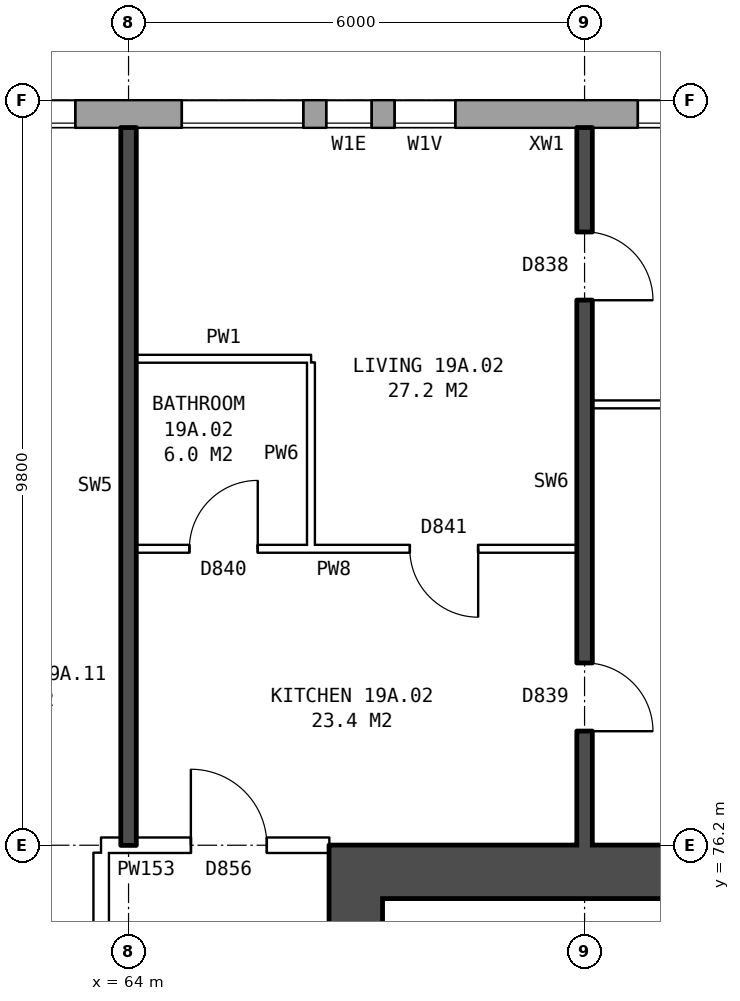
"""IFC4 building model, lengths in metres.
Left out: names, types, materials, properties, quantities, classifications, styles, units other than length and angle.
Written with IfcOpenShell. Run it as: python <this file> out.ifc"""

import sys

from ifc_helpers import new_model, si_unit, direction, frame, frame_2d, origin, place, context, subcontext, project, spatial, rectangle, extrude, element, fill, save


model = new_model("IFC4")
c1 = context("Model", 3, precision=1e-05, world=origin(), true_north=direction((0.0, 1.0)))
c2 = subcontext(c1, "Body", "Model", "MODEL_VIEW")
j1 = project(units=[si_unit("LENGTHUNIT", "METRE"), si_unit("PLANEANGLEUNIT", "RADIAN")], contexts=[c1])
p1 = place(None, origin())
s1 = spatial("IfcSite", under=j1, at=p1, CompositionType="ELEMENT")
p2 = place(p1, origin())
s2 = spatial("IfcBuilding", under=s1, at=p2, CompositionType="ELEMENT")
p3 = place(p2, frame((0.0, 0.0, 71.6)))
s3 = spatial("IfcBuildingStorey", under=s2, at=p3, CompositionType="ELEMENT", Elevation=71.6)
p4 = place(p3, frame((72.925, 85.82, 0.0), z_axis=(0.0, 0.0, 1.0), x_axis=(-1.0, 0.0, 0.0)))
e1 = element("IfcWall", 1, at=p4, inside=s3, PredefinedType="STANDARD", context=c2, shape_type="SweptSolid", body=[
    extrude(rectangle(XDim=46.601, YDim=0.36, at=frame_2d((23.3, 0.0))), origin(), (0.0, 0.0, 1.0), 2.85),
])
p5 = place(p4, frame((0.625, 0.0, 0.8)))
e2 = element("IfcOpeningElement", 2, at=p5, cuts=e1, PredefinedType="OPENING", context=c2, shape_type="SweptSolid", body=[
    extrude(rectangle(XDim=1.6, YDim=1.8, at=frame_2d((0.8, 0.9))), frame((0.0, 0.19, 0.0), z_axis=(0.0, -1.0, 0.0), x_axis=(1.0, 0.0, 0.0)), (0.0, 0.0, 1.0), 0.38),
])
p6 = place(p4, frame((4.625, 0.0, 0.8)))
e3 = element("IfcOpeningElement", 3, at=p6, cuts=e1, PredefinedType="OPENING", context=c2, shape_type="SweptSolid", body=[
    extrude(rectangle(XDim=0.8, YDim=0.9, at=frame_2d((0.4, 0.45))), frame((0.0, 0.19, 0.0), z_axis=(0.0, -1.0, 0.0), x_axis=(1.0, 0.0, 0.0)), (0.0, 0.0, 1.0), 0.38),
])
p7 = place(p4, frame((6.625, 0.0, 0.8)))
e4 = element("IfcOpeningElement", 4, at=p7, cuts=e1, PredefinedType="OPENING", context=c2, shape_type="SweptSolid", body=[
    extrude(rectangle(XDim=1.6, YDim=1.8, at=frame_2d((0.8, 0.9))), frame((0.0, 0.19, 0.0), z_axis=(0.0, -1.0, 0.0), x_axis=(1.0, 0.0, 0.0)), (0.0, 0.0, 1.0), 0.38),
])
p8 = place(p4, frame((9.625, 0.0, 0.8)))
e5 = element("IfcOpeningElement", 5, at=p8, cuts=e1, PredefinedType="OPENING", context=c2, shape_type="SweptSolid", body=[
    extrude(rectangle(XDim=1.6, YDim=1.8, at=frame_2d((0.8, 0.9))), frame((0.0, 0.19, 0.0), z_axis=(0.0, -1.0, 0.0), x_axis=(1.0, 0.0, 0.0)), (0.0, 0.0, 1.0), 0.38),
])
p9 = place(p4, frame((12.625, 0.0, 0.8)))
e6 = element("IfcOpeningElement", 6, at=p9, cuts=e1, PredefinedType="OPENING", context=c2, shape_type="SweptSolid", body=[
    extrude(rectangle(XDim=1.6, YDim=1.8, at=frame_2d((0.8, 0.9))), frame((0.0, 0.19, 0.0), z_axis=(0.0, -1.0, 0.0), x_axis=(1.0, 0.0, 0.0)), (0.0, 0.0, 1.0), 0.38),
])
p10 = place(p4, frame((15.625, 0.0, 0.8)))
e7 = element("IfcOpeningElement", 7, at=p10, cuts=e1, PredefinedType="OPENING", context=c2, shape_type="SweptSolid", body=[
    extrude(rectangle(XDim=1.6, YDim=1.8, at=frame_2d((0.8, 0.9))), frame((0.0, 0.19, 0.0), z_axis=(0.0, -1.0, 0.0), x_axis=(1.0, 0.0, 0.0)), (0.0, 0.0, 1.0), 0.38),
])
p11 = place(p4, frame((18.625, 0.0, 0.8)))
e8 = element("IfcOpeningElement", 8, at=p11, cuts=e1, PredefinedType="OPENING", context=c2, shape_type="SweptSolid", body=[
    extrude(rectangle(XDim=1.6, YDim=1.8, at=frame_2d((0.8, 0.9))), frame((0.0, 0.19, 0.0), z_axis=(0.0, -1.0, 0.0), x_axis=(1.0, 0.0, 0.0)), (0.0, 0.0, 1.0), 0.38),
])
p12 = place(p4, frame((21.625, 0.0, 0.8)))
e9 = element("IfcOpeningElement", 9, at=p12, cuts=e1, PredefinedType="OPENING", context=c2, shape_type="SweptSolid", body=[
    extrude(rectangle(XDim=1.6, YDim=1.8, at=frame_2d((0.8, 0.9))), frame((0.0, 0.19, 0.0), z_axis=(0.0, -1.0, 0.0), x_axis=(1.0, 0.0, 0.0)), (0.0, 0.0, 1.0), 0.38),
])
p13 = place(p4, frame((24.625, 0.0, 0.8)))
e10 = element("IfcOpeningElement", 10, at=p13, cuts=e1, PredefinedType="OPENING", context=c2, shape_type="SweptSolid", body=[
    extrude(rectangle(XDim=1.6, YDim=1.8, at=frame_2d((0.8, 0.9))), frame((0.0, 0.19, 0.0), z_axis=(0.0, -1.0, 0.0), x_axis=(1.0, 0.0, 0.0)), (0.0, 0.0, 1.0), 0.38),
])
p14 = place(p4, frame((27.625, 0.0, 0.8)))
e11 = element("IfcOpeningElement", 11, at=p14, cuts=e1, PredefinedType="OPENING", context=c2, shape_type="SweptSolid", body=[
    extrude(rectangle(XDim=1.6, YDim=1.8, at=frame_2d((0.8, 0.9))), frame((0.0, 0.19, 0.0), z_axis=(0.0, -1.0, 0.0), x_axis=(1.0, 0.0, 0.0)), (0.0, 0.0, 1.0), 0.38),
])
p15 = place(p4, frame((30.625, 0.0, 0.8)))
e12 = element("IfcOpeningElement", 12, at=p15, cuts=e1, PredefinedType="OPENING", context=c2, shape_type="SweptSolid", body=[
    extrude(rectangle(XDim=1.6, YDim=1.8, at=frame_2d((0.8, 0.9))), frame((0.0, 0.19, 0.0), z_axis=(0.0, -1.0, 0.0), x_axis=(1.0, 0.0, 0.0)), (0.0, 0.0, 1.0), 0.38),
])
p16 = place(p4, frame((33.625, 0.0, 0.8)))
e13 = element("IfcOpeningElement", 13, at=p16, cuts=e1, PredefinedType="OPENING", context=c2, shape_type="SweptSolid", body=[
    extrude(rectangle(XDim=1.6, YDim=1.8, at=frame_2d((0.8, 0.9))), frame((0.0, 0.19, 0.0), z_axis=(0.0, -1.0, 0.0), x_axis=(1.0, 0.0, 0.0)), (0.0, 0.0, 1.0), 0.38),
])
p17 = place(p4, frame((36.625, 0.0, 0.8)))
e14 = element("IfcOpeningElement", 14, at=p17, cuts=e1, PredefinedType="OPENING", context=c2, shape_type="SweptSolid", body=[
    extrude(rectangle(XDim=1.6, YDim=1.8, at=frame_2d((0.8, 0.9))), frame((0.0, 0.19, 0.0), z_axis=(0.0, -1.0, 0.0), x_axis=(1.0, 0.0, 0.0)), (0.0, 0.0, 1.0), 0.38),
])
p18 = place(p4, frame((39.625, 0.0, 0.8)))
e15 = element("IfcOpeningElement", 15, at=p18, cuts=e1, PredefinedType="OPENING", context=c2, shape_type="SweptSolid", body=[
    extrude(rectangle(XDim=1.6, YDim=1.8, at=frame_2d((0.8, 0.9))), frame((0.0, 0.19, 0.0), z_axis=(0.0, -1.0, 0.0), x_axis=(1.0, 0.0, 0.0)), (0.0, 0.0, 1.0), 0.38),
])
p19 = place(p4, frame((43.225, 0.0, 1.7)))
e16 = element("IfcOpeningElement", 16, at=p19, cuts=e1, PredefinedType="OPENING", context=c2, shape_type="SweptSolid", body=[
    extrude(rectangle(XDim=0.6, YDim=0.9, at=frame_2d((0.3, 0.45))), frame((0.0, 0.19, 0.0), z_axis=(0.0, -1.0, 0.0), x_axis=(1.0, 0.0, 0.0)), (0.0, 0.0, 1.0), 0.38),
])
p20 = place(p4, frame((5.725, 0.0, 0.8)))
e17 = element("IfcOpeningElement", 17, at=p20, cuts=e1, PredefinedType="OPENING", context=c2, shape_type="SweptSolid", body=[
    extrude(rectangle(XDim=0.6, YDim=1.8, at=frame_2d((0.3, 0.9))), frame((0.0, 0.19, 0.0), z_axis=(0.0, -1.0, 0.0), x_axis=(1.0, 0.0, 0.0)), (0.0, 0.0, 1.0), 0.38),
])
p21 = place(p4, frame((44.125, 0.0, 1.0)))
e18 = element("IfcOpeningElement", 18, at=p21, cuts=e1, PredefinedType="OPENING", context=c2, shape_type="SweptSolid", body=[
    extrude(rectangle(XDim=0.6, YDim=1.5, at=frame_2d((0.3, 0.75))), frame((0.0, 0.19, 0.0), z_axis=(0.0, -1.0, 0.0), x_axis=(1.0, 0.0, 0.0)), (0.0, 0.0, 1.0), 0.38),
])
p22 = place(p3, frame((66.99, 64.5, 0.0), z_axis=(0.0, 0.0, 1.0), x_axis=(0.0, 1.0, 0.0)))
e19 = element("IfcWall", 19, at=p22, inside=s3, PredefinedType="SHEAR", context=c2, shape_type="SweptSolid", body=[
    extrude(rectangle(XDim=11.0, YDim=0.7, at=frame_2d((5.5, 0.0))), origin(), (0.0, 0.0, 1.0), 2.85),
])
p23 = place(p22, frame((0.625, 0.0, 0.0)))
e20 = element("IfcOpeningElement", 20, at=p23, cuts=e19, PredefinedType="OPENING", context=c2, shape_type="SweptSolid", body=[
    extrude(rectangle(XDim=1.1, YDim=2.1, at=frame_2d((0.55, 1.05))), frame((0.0, 0.36, 0.0), z_axis=(0.0, -1.0, 0.0), x_axis=(1.0, 0.0, 0.0)), (0.0, 0.0, 1.0), 0.72),
])
p24 = place(p22, frame((9.2, 0.0, 0.0)))
e21 = element("IfcOpeningElement", 21, at=p24, cuts=e19, PredefinedType="OPENING", context=c2, shape_type="SweptSolid", body=[
    extrude(rectangle(XDim=1.1, YDim=2.1, at=frame_2d((0.55, 1.05))), frame((0.0, 0.36, 0.0), z_axis=(0.0, -1.0, 0.0), x_axis=(1.0, 0.0, 0.0)), (0.0, 0.0, 1.0), 0.72),
])
p25 = place(p3, frame((66.64, 75.85, 0.0), z_axis=(0.0, 0.0, 1.0), x_axis=(1.0, 0.0, 0.0)))
e22 = element("IfcWall", 22, at=p25, inside=s3, PredefinedType="SHEAR", context=c2, shape_type="SweptSolid", body=[
    extrude(rectangle(XDim=9.0, YDim=0.7, at=frame_2d((4.5, 0.0))), origin(), (0.0, 0.0, 1.0), 2.85),
])
p26 = place(p3, frame((63.64, 63.9, 0.0), z_axis=(0.0, 0.0, 1.0), x_axis=(0.0, 1.0, 0.0)))
e23 = element("IfcWall", 23, at=p26, inside=s3, PredefinedType="PARTITIONING", context=c2, shape_type="SweptSolid", body=[
    extrude(rectangle(XDim=12.2, YDim=0.2, at=frame_2d((6.1, 0.0))), origin(), (0.0, 0.0, 1.0), 2.85),
])
p27 = place(p26, frame((5.1, 0.0, 0.0)))
e24 = element("IfcOpeningElement", 24, at=p27, cuts=e23, PredefinedType="OPENING", context=c2, shape_type="SweptSolid", body=[
    extrude(rectangle(XDim=2.0, YDim=2.1, at=frame_2d((1.0, 1.05))), frame((0.0, 0.11, 0.0), z_axis=(0.0, -1.0, 0.0), x_axis=(1.0, 0.0, 0.0)), (0.0, 0.0, 1.0), 0.22),
])
p28 = place(p3, frame((63.64, 76.2, 0.0), z_axis=(0.0, 0.0, 1.0), x_axis=(1.0, 0.0, 0.0)))
e25 = element("IfcWall", 25, at=p28, inside=s3, PredefinedType="PARTITIONING", context=c2, shape_type="SweptSolid", body=[
    extrude(rectangle(XDim=3.0, YDim=0.2, at=frame_2d((1.5, 0.0))), origin(), (0.0, 0.0, 1.0), 2.85),
])
p29 = place(p28, frame((1.18, 0.0, 0.0)))
e26 = element("IfcOpeningElement", 26, at=p29, cuts=e25, PredefinedType="OPENING", context=c2, shape_type="SweptSolid", body=[
    extrude(rectangle(XDim=1.0, YDim=2.1, at=frame_2d((0.5, 1.05))), frame((0.0, 0.11, 0.0), z_axis=(0.0, -1.0, 0.0), x_axis=(1.0, 0.0, 0.0)), (0.0, 0.0, 1.0), 0.22),
])
p30 = place(p3, frame((64.1, 80.1, 0.0), z_axis=(0.0, 0.0, 1.0), x_axis=(1.0, 0.0, 0.0)))
e27 = element("IfcWall", 27, at=p30, inside=s3, PredefinedType="PARTITIONING", context=c2, shape_type="SweptSolid", body=[
    extrude(rectangle(XDim=5.8, YDim=0.1, at=frame_2d((2.9, 0.0))), origin(), (0.0, 0.0, 1.0), 2.85),
])
p31 = place(p30, frame((3.6, 0.0, 0.0)))
e28 = element("IfcOpeningElement", 28, at=p31, cuts=e27, PredefinedType="OPENING", context=c2, shape_type="SweptSolid", body=[
    extrude(rectangle(XDim=0.9, YDim=2.1, at=frame_2d((0.45, 1.05))), frame((0.0, 0.06, 0.0), z_axis=(0.0, -1.0, 0.0), x_axis=(1.0, 0.0, 0.0)), (0.0, 0.0, 1.0), 0.12),
])
p32 = place(p30, frame((0.7, 0.0, 0.0)))
e29 = element("IfcOpeningElement", 29, at=p32, cuts=e27, PredefinedType="OPENING", context=c2, shape_type="SweptSolid", body=[
    extrude(rectangle(XDim=0.9, YDim=2.1, at=frame_2d((0.45, 1.05))), frame((0.0, 0.06, 0.0), z_axis=(0.0, -1.0, 0.0), x_axis=(1.0, 0.0, 0.0)), (0.0, 0.0, 1.0), 0.12),
])
p33 = place(p3, frame((70.1, 82.0, 0.0), z_axis=(0.0, 0.0, 1.0), x_axis=(1.0, 0.0, 0.0)))
e30 = element("IfcWall", 30, at=p33, inside=s3, PredefinedType="PARTITIONING", context=c2, shape_type="SweptSolid", body=[
    extrude(rectangle(XDim=5.54, YDim=0.1, at=frame_2d((2.77, 0.0))), origin(), (0.0, 0.0, 1.0), 2.85),
])
p34 = place(p3, frame((64.1, 82.6, 0.0), z_axis=(0.0, 0.0, 1.0), x_axis=(1.0, 0.0, 0.0)))
e31 = element("IfcWall", 31, at=p34, inside=s3, PredefinedType="PARTITIONING", context=c2, shape_type="SweptSolid", body=[
    extrude(rectangle(XDim=2.3, YDim=0.1, at=frame_2d((1.15, 0.0))), origin(), (0.0, 0.0, 1.0), 2.85),
])
p35 = place(p3, frame((64.0, 76.2, 0.0), z_axis=(0.0, 0.0, 1.0), x_axis=(0.0, 1.0, 0.0)))
e32 = element("IfcWall", 32, at=p35, inside=s3, PredefinedType="SOLIDWALL", context=c2, shape_type="SweptSolid", body=[
    extrude(rectangle(XDim=9.44, YDim=0.2, at=frame_2d((4.72, 0.0))), origin(), (0.0, 0.0, 1.0), 2.85),
])
p36 = place(p3, frame((66.4, 80.15, 0.0), z_axis=(0.0, 0.0, 1.0), x_axis=(0.0, 1.0, 0.0)))
e33 = element("IfcWall", 33, at=p36, inside=s3, PredefinedType="PARTITIONING", context=c2, shape_type="SweptSolid", body=[
    extrude(rectangle(XDim=2.4, YDim=0.1, at=frame_2d((1.2, 0.0))), origin(), (0.0, 0.0, 1.0), 2.85),
])
p37 = place(p3, frame((70.0, 76.2, 0.0), z_axis=(0.0, 0.0, 1.0), x_axis=(0.0, 1.0, 0.0)))
e34 = element("IfcWall", 34, at=p37, inside=s3, PredefinedType="SOLIDWALL", context=c2, shape_type="SweptSolid", body=[
    extrude(rectangle(XDim=9.44, YDim=0.2, at=frame_2d((4.72, 0.0))), origin(), (0.0, 0.0, 1.0), 2.85),
])
p38 = place(p37, frame((7.17, 0.0, 0.0)))
e35 = element("IfcOpeningElement", 35, at=p38, cuts=e34, PredefinedType="OPENING", context=c2, shape_type="SweptSolid", body=[
    extrude(rectangle(XDim=0.9, YDim=2.1, at=frame_2d((0.45, 1.05))), frame((0.0, 0.11, 0.0), z_axis=(0.0, -1.0, 0.0), x_axis=(1.0, 0.0, 0.0)), (0.0, 0.0, 1.0), 0.22),
])
p39 = place(p37, frame((1.5, 0.0, 0.0)))
e36 = element("IfcOpeningElement", 36, at=p39, cuts=e34, PredefinedType="OPENING", context=c2, shape_type="SweptSolid", body=[
    extrude(rectangle(XDim=0.9, YDim=2.1, at=frame_2d((0.45, 1.05))), frame((0.0, 0.11, 0.0), z_axis=(0.0, -1.0, 0.0), x_axis=(1.0, 0.0, 0.0)), (0.0, 0.0, 1.0), 0.22),
])
p40 = place(p5, origin())
e37 = element("IfcWindow", 37, at=p40, inside=s3, PartitioningType="SINGLE_PANEL", PredefinedType="WINDOW", context=c2, shape_type="SweptSolid", body=[
    extrude(rectangle(XDim=1.6, YDim=1.8, at=frame_2d((0.8, 0.9))), frame((0.0, 0.15, 0.0), z_axis=(0.0, -1.0, 0.0), x_axis=(1.0, 0.0, 0.0)), (0.0, 0.0, 1.0), 0.06),
])
fill(e2, e37)
p41 = place(p6, origin())
e38 = element("IfcWindow", 38, at=p41, inside=s3, PartitioningType="SINGLE_PANEL", PredefinedType="WINDOW", context=c2, shape_type="SweptSolid", body=[
    extrude(rectangle(XDim=0.8, YDim=0.9, at=frame_2d((0.4, 0.45))), frame((0.0, 0.15, 0.0), z_axis=(0.0, -1.0, 0.0), x_axis=(1.0, 0.0, 0.0)), (0.0, 0.0, 1.0), 0.06),
])
fill(e3, e38)
p42 = place(p7, origin())
e39 = element("IfcWindow", 39, at=p42, inside=s3, PartitioningType="SINGLE_PANEL", PredefinedType="WINDOW", context=c2, shape_type="SweptSolid", body=[
    extrude(rectangle(XDim=1.6, YDim=1.8, at=frame_2d((0.8, 0.9))), frame((0.0, 0.15, 0.0), z_axis=(0.0, -1.0, 0.0), x_axis=(1.0, 0.0, 0.0)), (0.0, 0.0, 1.0), 0.06),
])
fill(e4, e39)
p43 = place(p8, origin())
e40 = element("IfcWindow", 40, at=p43, inside=s3, PartitioningType="SINGLE_PANEL", PredefinedType="WINDOW", context=c2, shape_type="SweptSolid", body=[
    extrude(rectangle(XDim=1.6, YDim=1.8, at=frame_2d((0.8, 0.9))), frame((0.0, 0.15, 0.0), z_axis=(0.0, -1.0, 0.0), x_axis=(1.0, 0.0, 0.0)), (0.0, 0.0, 1.0), 0.06),
])
fill(e5, e40)
p44 = place(p38, frame((0.9, 0.0, 0.0), z_axis=(0.0, 0.0, 1.0), x_axis=(-1.0, 0.0, 0.0)))
e41 = element("IfcDoor", 41, at=p44, inside=s3, OperationType="SINGLE_SWING_RIGHT", PredefinedType="DOOR", context=c2, shape_type="SweptSolid", body=[
    extrude(rectangle(XDim=0.9, YDim=2.1, at=frame_2d((0.45, 1.05))), frame((0.0, 0.025, 0.0), z_axis=(0.0, -1.0, 0.0), x_axis=(1.0, 0.0, 0.0)), (0.0, 0.0, 1.0), 0.05),
])
fill(e35, e41)
p45 = place(p39, frame((0.9, 0.0, 0.0), z_axis=(0.0, 0.0, 1.0), x_axis=(-1.0, 0.0, 0.0)))
e42 = element("IfcDoor", 42, at=p45, inside=s3, OperationType="SINGLE_SWING_RIGHT", PredefinedType="DOOR", context=c2, shape_type="SweptSolid", body=[
    extrude(rectangle(XDim=0.9, YDim=2.1, at=frame_2d((0.45, 1.05))), frame((0.0, 0.025, 0.0), z_axis=(0.0, -1.0, 0.0), x_axis=(1.0, 0.0, 0.0)), (0.0, 0.0, 1.0), 0.05),
])
fill(e36, e42)
p46 = place(p29, origin())
e43 = element("IfcDoor", 43, at=p46, inside=s3, OperationType="SINGLE_SWING_LEFT", PredefinedType="DOOR", context=c2, shape_type="SweptSolid", body=[
    extrude(rectangle(XDim=1.0, YDim=2.1, at=frame_2d((0.5, 1.05))), frame((0.0, 0.025, 0.0), z_axis=(0.0, -1.0, 0.0), x_axis=(1.0, 0.0, 0.0)), (0.0, 0.0, 1.0), 0.05),
])
fill(e26, e43)
p47 = place(p31, frame((0.9, 0.0, 0.0), z_axis=(0.0, 0.0, 1.0), x_axis=(-1.0, 0.0, 0.0)))
e44 = element("IfcDoor", 44, at=p47, inside=s3, OperationType="SINGLE_SWING_LEFT", PredefinedType="DOOR", context=c2, shape_type="SweptSolid", body=[
    extrude(rectangle(XDim=0.9, YDim=2.1, at=frame_2d((0.45, 1.05))), frame((0.0, 0.025, 0.0), z_axis=(0.0, -1.0, 0.0), x_axis=(1.0, 0.0, 0.0)), (0.0, 0.0, 1.0), 0.05),
])
fill(e28, e44)
p48 = place(p32, origin())
e45 = element("IfcDoor", 45, at=p48, inside=s3, OperationType="SINGLE_SWING_RIGHT", PredefinedType="DOOR", context=c2, shape_type="SweptSolid", body=[
    extrude(rectangle(XDim=0.9, YDim=2.1, at=frame_2d((0.45, 1.05))), frame((0.0, 0.025, 0.0), z_axis=(0.0, -1.0, 0.0), x_axis=(1.0, 0.0, 0.0)), (0.0, 0.0, 1.0), 0.05),
])
fill(e29, e45)
p49 = place(p20, origin())
e46 = element("IfcWindow", 46, at=p49, inside=s3, PartitioningType="SINGLE_PANEL", PredefinedType="WINDOW", context=c2, shape_type="SweptSolid", body=[
    extrude(rectangle(XDim=0.6, YDim=1.8, at=frame_2d((0.3, 0.9))), frame((0.0, 0.15, 0.0), z_axis=(0.0, -1.0, 0.0), x_axis=(1.0, 0.0, 0.0)), (0.0, 0.0, 1.0), 0.06),
])
fill(e17, e46)
save(model, sys.argv[1])
